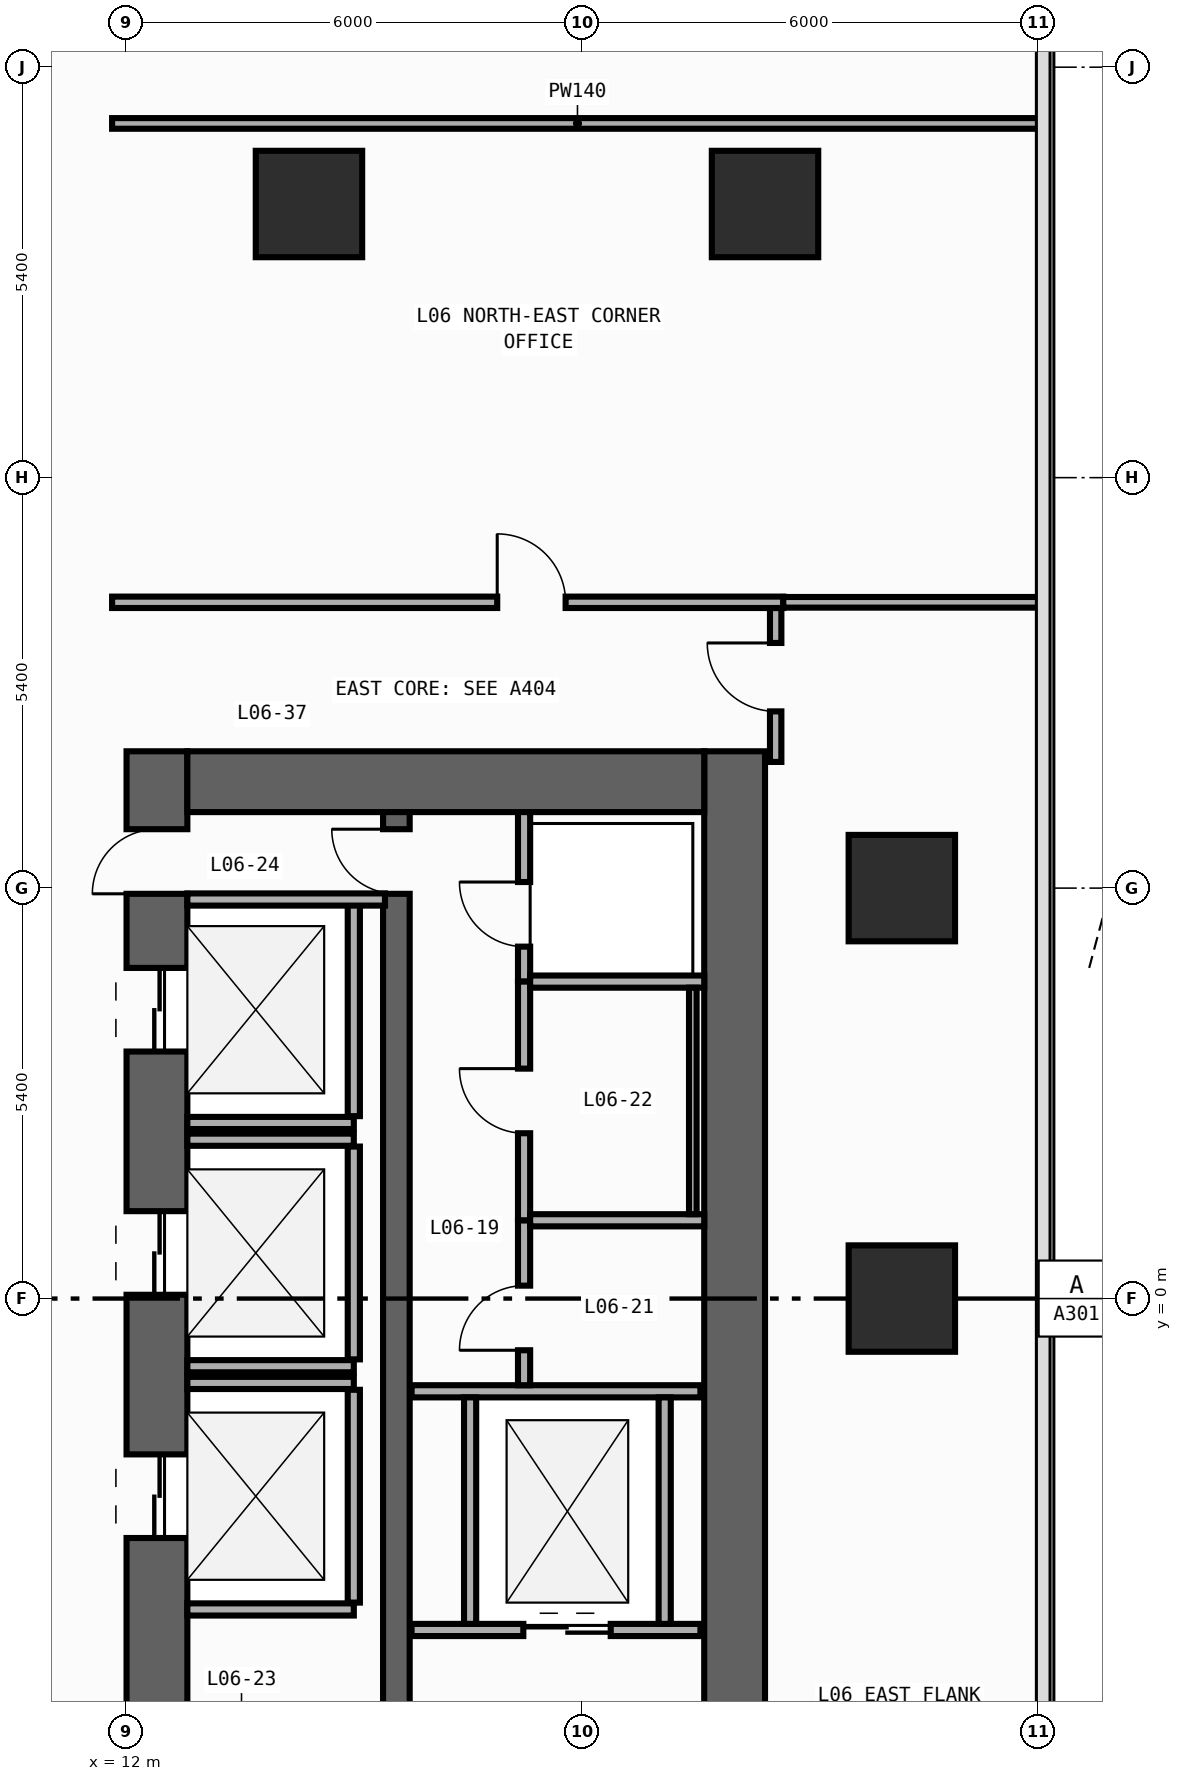
"""IFC4 building model, lengths in metres.
Left out: names, types, materials, properties, quantities, classifications, styles, units other than length and angle.
Written with IfcOpenShell. Run it as: python <this file> out.ifc"""

import sys

from ifc_helpers import new_model, si_unit, direction, frame, frame_2d, origin, origin_2d, place, context, subcontext, project, spatial, rectangle, extrude, element, fill, save


model = new_model("IFC4")
c1 = context("Model", 3, precision=1e-05, world=origin(), true_north=direction((0.0, 1.0)))
c2 = subcontext(c1, "Body", "Model", "MODEL_VIEW")
j1 = project(units=[si_unit("LENGTHUNIT", "METRE"), si_unit("PLANEANGLEUNIT", "RADIAN")], contexts=[c1])
p1 = place(None, origin())
s1 = spatial("IfcSite", under=j1, at=p1, CompositionType="ELEMENT")
p2 = place(p1, origin())
s2 = spatial("IfcBuilding", under=s1, at=p2, CompositionType="ELEMENT")
p3 = place(p2, frame((0.0, 0.0, 26.0)))
s3 = spatial("IfcBuildingStorey", under=s2, at=p3, CompositionType="ELEMENT", Elevation=26.0)
p4 = place(p3, frame((12.4, -19.8, 0.0), z_axis=(0.0, 0.0, 1.0), x_axis=(0.0, 1.0, 0.0)))
e1 = element("IfcWall", 1, at=p4, inside=s3, PredefinedType="SHEAR", context=c2, shape_type="SweptSolid", body=[
    extrude(rectangle(XDim=27.0, YDim=0.8, at=frame_2d((13.5, 0.0))), origin(), (0.0, 0.0, 1.0), 3.94),
])
p5 = place(p4, frame((23.05, 0.0, 0.0)))
e2 = element("IfcOpeningElement", 2, at=p5, cuts=e1, PredefinedType="OPENING", context=c2, shape_type="SweptSolid", body=[
    extrude(rectangle(XDim=1.1, YDim=2.2, at=frame_2d((0.55, 1.1))), frame((0.0, 0.41, 0.0), z_axis=(0.0, -1.0, 0.0), x_axis=(1.0, 0.0, 0.0)), (0.0, 0.0, 1.0), 0.82),
])
p6 = place(p4, frame((19.85, 0.0, 0.0)))
e3 = element("IfcOpeningElement", 3, at=p6, cuts=e1, PredefinedType="OPENING", context=c2, shape_type="SweptSolid", body=[
    extrude(rectangle(XDim=1.1, YDim=2.2, at=frame_2d((0.55, 1.1))), frame((0.0, 0.41, 0.0), z_axis=(0.0, -1.0, 0.0), x_axis=(1.0, 0.0, 0.0)), (0.0, 0.0, 1.0), 0.82),
])
p7 = place(p4, frame((16.65, 0.0, 0.0)))
e4 = element("IfcOpeningElement", 4, at=p7, cuts=e1, PredefinedType="OPENING", context=c2, shape_type="SweptSolid", body=[
    extrude(rectangle(XDim=1.1, YDim=2.2, at=frame_2d((0.55, 1.1))), frame((0.0, 0.41, 0.0), z_axis=(0.0, -1.0, 0.0), x_axis=(1.0, 0.0, 0.0)), (0.0, 0.0, 1.0), 0.82),
])
p8 = place(p4, frame((6.275, 0.0, 0.0)))
e5 = element("IfcOpeningElement", 5, at=p8, cuts=e1, PredefinedType="OPENING", context=c2, shape_type="SweptSolid", body=[
    extrude(rectangle(XDim=0.85, YDim=2.1, at=frame_2d((0.425, 1.05))), frame((0.0, 0.41, 0.0), z_axis=(0.0, -1.0, 0.0), x_axis=(1.0, 0.0, 0.0)), (0.0, 0.0, 1.0), 0.82),
])
p9 = place(p4, frame((8.575, 0.0, 0.0)))
e6 = element("IfcOpeningElement", 6, at=p9, cuts=e1, PredefinedType="OPENING", context=c2, shape_type="SweptSolid", body=[
    extrude(rectangle(XDim=0.85, YDim=2.1, at=frame_2d((0.425, 1.05))), frame((0.0, 0.41, 0.0), z_axis=(0.0, -1.0, 0.0), x_axis=(1.0, 0.0, 0.0)), (0.0, 0.0, 1.0), 0.82),
])
p10 = place(p4, frame((10.675, 0.0, 0.0)))
e7 = element("IfcOpeningElement", 7, at=p10, cuts=e1, PredefinedType="OPENING", context=c2, shape_type="SweptSolid", body=[
    extrude(rectangle(XDim=0.85, YDim=2.1, at=frame_2d((0.425, 1.05))), frame((0.0, 0.41, 0.0), z_axis=(0.0, -1.0, 0.0), x_axis=(1.0, 0.0, 0.0)), (0.0, 0.0, 1.0), 0.82),
])
p11 = place(p4, frame((12.725, 0.0, 0.0)))
e8 = element("IfcOpeningElement", 8, at=p11, cuts=e1, PredefinedType="OPENING", context=c2, shape_type="SweptSolid", body=[
    extrude(rectangle(XDim=1.15, YDim=2.2, at=frame_2d((0.575, 1.1))), frame((0.0, 0.41, 0.0), z_axis=(0.0, -1.0, 0.0), x_axis=(1.0, 0.0, 0.0)), (0.0, 0.0, 1.0), 0.82),
])
p12 = place(p4, frame((25.125, 0.0, 0.0)))
e9 = element("IfcOpeningElement", 9, at=p12, cuts=e1, PredefinedType="OPENING", context=c2, shape_type="SweptSolid", body=[
    extrude(rectangle(XDim=0.85, YDim=2.1, at=frame_2d((0.425, 1.05))), frame((0.0, 0.41, 0.0), z_axis=(0.0, -1.0, 0.0), x_axis=(1.0, 0.0, 0.0)), (0.0, 0.0, 1.0), 0.82),
])
p13 = place(p3, frame((20.0, -19.8, 0.0), z_axis=(0.0, 0.0, 1.0), x_axis=(0.0, 1.0, 0.0)))
e10 = element("IfcWall", 10, at=p13, inside=s3, PredefinedType="SHEAR", context=c2, shape_type="SweptSolid", body=[
    extrude(rectangle(XDim=27.0, YDim=0.8, at=frame_2d((13.5, 0.0))), origin(), (0.0, 0.0, 1.0), 3.94),
])
p14 = place(p3, frame((12.8, 6.8, 0.0), z_axis=(0.0, 0.0, 1.0), x_axis=(1.0, 0.0, 0.0)))
e11 = element("IfcWall", 11, at=p14, inside=s3, PredefinedType="SHEAR", context=c2, shape_type="SweptSolid", body=[
    extrude(rectangle(XDim=6.8, YDim=0.8, at=frame_2d((3.4, 0.0))), origin(), (0.0, 0.0, 1.0), 3.94),
])
p15 = place(p3, frame((15.55, -19.0, 0.0), z_axis=(0.0, 0.0, 1.0), x_axis=(0.0, 1.0, 0.0)))
e12 = element("IfcWall", 12, at=p15, inside=s3, PredefinedType="SHEAR", context=c2, shape_type="SweptSolid", body=[
    extrude(rectangle(XDim=25.4, YDim=0.35, at=frame_2d((12.7, 0.0))), origin(), (0.0, 0.0, 1.0), 3.94),
])
p16 = place(p15, frame((11.925, 0.0, 0.0)))
e13 = element("IfcOpeningElement", 13, at=p16, cuts=e12, PredefinedType="OPENING", context=c2, shape_type="SweptSolid", body=[
    extrude(rectangle(XDim=1.15, YDim=2.2, at=frame_2d((0.575, 1.1))), frame((0.0, 0.185, 0.0), z_axis=(0.0, -1.0, 0.0), x_axis=(1.0, 0.0, 0.0)), (0.0, 0.0, 1.0), 0.37),
])
p17 = place(p15, frame((24.325, 0.0, 0.0)))
e14 = element("IfcOpeningElement", 14, at=p17, cuts=e12, PredefinedType="OPENING", context=c2, shape_type="SweptSolid", body=[
    extrude(rectangle(XDim=0.85, YDim=2.1, at=frame_2d((0.425, 1.05))), frame((0.0, 0.185, 0.0), z_axis=(0.0, -1.0, 0.0), x_axis=(1.0, 0.0, 0.0)), (0.0, 0.0, 1.0), 0.37),
])
for number, where, z_axis, x_axis in (
    (15, (20.4, 14.4, 0.0), (0.0, 0.0, 1.0), (1.0, 0.0, 0.0)),
    (16, (14.4, 14.4, 0.0), (0.0, 0.0, 1.0), (1.0, 0.0, 0.0)),
    (17, (22.2, 0.0, 0.0), (0.0, 0.0, 1.0), (1.0, 0.0, 0.0)),
    (18, (22.2, 5.4, 0.0), (0.0, 0.0, 1.0), (1.0, 0.0, 0.0)),
):
    element("IfcColumn", number, at=place(p3, frame(where, z_axis=z_axis, x_axis=x_axis)), inside=s3, PredefinedType="COLUMN", context=c2, shape_type="SweptSolid", body=[
        extrude(rectangle(XDim=1.4, YDim=1.4, at=origin_2d()), origin(), (0.0, 0.0, 1.0), 4.2),
    ])
p18 = place(p3, frame((12.8, 2.31, 0.0), z_axis=(0.0, 0.0, 1.0), x_axis=(1.0, 0.0, 0.0)))
e19 = element("IfcWall", 19, at=p18, inside=s3, PredefinedType="STANDARD", context=c2, shape_type="SweptSolid", body=[
    extrude(rectangle(XDim=2.19, YDim=0.16, at=frame_2d((1.095, 0.0))), origin(), (0.0, 0.0, 1.0), 3.94),
])
p19 = place(p3, frame((14.99, 2.4, 0.0), z_axis=(0.0, 0.0, 1.0), x_axis=(0.0, 1.0, 0.0)))
e20 = element("IfcWall", 20, at=p19, inside=s3, PredefinedType="STANDARD", context=c2, shape_type="SweptSolid", body=[
    extrude(rectangle(XDim=2.8, YDim=0.16, at=frame_2d((1.4, 0.0))), origin(), (0.0, 0.0, 1.0), 3.94),
])
for number, where, z_axis, x_axis in (
    (21, (12.8, -0.89, 0.0), (0.0, 0.0, 1.0), (1.0, 0.0, 0.0)),
    (22, (12.8, 2.09, 0.0), (0.0, 0.0, 1.0), (1.0, 0.0, 0.0)),
):
    element("IfcWall", number, at=place(p3, frame(where, z_axis=z_axis, x_axis=x_axis)), inside=s3, PredefinedType="STANDARD", context=c2, shape_type="SweptSolid", body=[
        extrude(rectangle(XDim=2.19, YDim=0.16, at=frame_2d((1.095, 0.0))), origin(), (0.0, 0.0, 1.0), 3.94),
    ])
p20 = place(p3, frame((14.99, -0.8, 0.0), z_axis=(0.0, 0.0, 1.0), x_axis=(0.0, 1.0, 0.0)))
e23 = element("IfcWall", 23, at=p20, inside=s3, PredefinedType="STANDARD", context=c2, shape_type="SweptSolid", body=[
    extrude(rectangle(XDim=2.8, YDim=0.16, at=frame_2d((1.4, 0.0))), origin(), (0.0, 0.0, 1.0), 3.94),
])
for number, where, z_axis, x_axis in (
    (24, (12.8, -4.09, 0.0), (0.0, 0.0, 1.0), (1.0, 0.0, 0.0)),
    (25, (12.8, -1.11, 0.0), (0.0, 0.0, 1.0), (1.0, 0.0, 0.0)),
):
    element("IfcWall", number, at=place(p3, frame(where, z_axis=z_axis, x_axis=x_axis)), inside=s3, PredefinedType="STANDARD", context=c2, shape_type="SweptSolid", body=[
        extrude(rectangle(XDim=2.19, YDim=0.16, at=frame_2d((1.095, 0.0))), origin(), (0.0, 0.0, 1.0), 3.94),
    ])
p21 = place(p3, frame((14.99, -4.0, 0.0), z_axis=(0.0, 0.0, 1.0), x_axis=(0.0, 1.0, 0.0)))
e26 = element("IfcWall", 26, at=p21, inside=s3, PredefinedType="STANDARD", context=c2, shape_type="SweptSolid", body=[
    extrude(rectangle(XDim=2.8, YDim=0.16, at=frame_2d((1.4, 0.0))), origin(), (0.0, 0.0, 1.0), 3.94),
])
p22 = place(p3, frame((15.75, -4.36, 0.0), z_axis=(0.0, 0.0, 1.0), x_axis=(1.0, 0.0, 0.0)))
e27 = element("IfcWall", 27, at=p22, inside=s3, PredefinedType="STANDARD", context=c2, shape_type="SweptSolid", body=[
    extrude(rectangle(XDim=3.8, YDim=0.16, at=frame_2d((1.9, 0.0))), origin(), (0.0, 0.0, 1.0), 3.94),
])
p23 = place(p22, frame((1.47, 0.0, 0.0)))
e28 = element("IfcOpeningElement", 28, at=p23, cuts=e27, PredefinedType="OPENING", context=c2, shape_type="SweptSolid", body=[
    extrude(rectangle(XDim=1.15, YDim=2.2, at=frame_2d((0.575, 1.1))), frame((0.0, 0.09, 0.0), z_axis=(0.0, -1.0, 0.0), x_axis=(1.0, 0.0, 0.0)), (0.0, 0.0, 1.0), 0.18),
])
p24 = place(p3, frame((15.75, -1.22, 0.0), z_axis=(0.0, 0.0, 1.0), x_axis=(1.0, 0.0, 0.0)))
e29 = element("IfcWall", 29, at=p24, inside=s3, PredefinedType="STANDARD", context=c2, shape_type="SweptSolid", body=[
    extrude(rectangle(XDim=3.8, YDim=0.16, at=frame_2d((1.9, 0.0))), origin(), (0.0, 0.0, 1.0), 3.94),
])
for number, where, z_axis, x_axis in (
    (30, (16.52, -4.28, 0.0), (0.0, 0.0, 1.0), (0.0, 1.0, 0.0)),
    (31, (19.08, -4.28, 0.0), (0.0, 0.0, 1.0), (0.0, 1.0, 0.0)),
):
    element("IfcWall", number, at=place(p3, frame(where, z_axis=z_axis, x_axis=x_axis)), inside=s3, PredefinedType="STANDARD", context=c2, shape_type="SweptSolid", body=[
        extrude(rectangle(XDim=2.98, YDim=0.16, at=frame_2d((1.49, 0.0))), origin(), (0.0, 0.0, 1.0), 3.94),
    ])
p25 = place(p3, frame((12.8, 5.25, 0.0), z_axis=(0.0, 0.0, 1.0), x_axis=(1.0, 0.0, 0.0)))
e32 = element("IfcWall", 32, at=p25, inside=s3, PredefinedType="STANDARD", context=c2, shape_type="SweptSolid", body=[
    extrude(rectangle(XDim=2.6, YDim=0.16, at=frame_2d((1.3, 0.0))), origin(), (0.0, 0.0, 1.0), 3.94),
])
p26 = place(p3, frame((17.23, 4.17, 0.0), z_axis=(0.0, 0.0, 1.0), x_axis=(0.0, 1.0, 0.0)))
e33 = element("IfcWall", 33, at=p26, inside=s3, PredefinedType="PARTITIONING", context=c2, shape_type="SweptSolid", body=[
    extrude(rectangle(XDim=2.23, YDim=0.16, at=frame_2d((1.115, 0.0))), origin(), (0.0, 0.0, 1.0), 3.94),
])
p27 = place(p26, frame((0.46, 0.0, 0.0)))
e34 = element("IfcOpeningElement", 34, at=p27, cuts=e33, PredefinedType="OPENING", context=c2, shape_type="SweptSolid", body=[
    extrude(rectangle(XDim=0.85, YDim=2.1, at=frame_2d((0.425, 1.05))), frame((0.0, 0.09, 0.0), z_axis=(0.0, -1.0, 0.0), x_axis=(1.0, 0.0, 0.0)), (0.0, 0.0, 1.0), 0.18),
])
p28 = place(p3, frame((17.23, -1.14, 0.0), z_axis=(0.0, 0.0, 1.0), x_axis=(0.0, 1.0, 0.0)))
e35 = element("IfcWall", 35, at=p28, inside=s3, PredefinedType="PARTITIONING", context=c2, shape_type="SweptSolid", body=[
    extrude(rectangle(XDim=2.17, YDim=0.16, at=frame_2d((1.085, 0.0))), origin(), (0.0, 0.0, 1.0), 3.94),
])
p29 = place(p28, frame((0.46, 0.0, 0.0)))
e36 = element("IfcOpeningElement", 36, at=p29, cuts=e35, PredefinedType="OPENING", context=c2, shape_type="SweptSolid", body=[
    extrude(rectangle(XDim=0.85, YDim=2.1, at=frame_2d((0.425, 1.05))), frame((0.0, 0.09, 0.0), z_axis=(0.0, -1.0, 0.0), x_axis=(1.0, 0.0, 0.0)), (0.0, 0.0, 1.0), 0.18),
])
p30 = place(p3, frame((17.23, 1.03, 0.0), z_axis=(0.0, 0.0, 1.0), x_axis=(0.0, 1.0, 0.0)))
e37 = element("IfcWall", 37, at=p30, inside=s3, PredefinedType="PARTITIONING", context=c2, shape_type="SweptSolid", body=[
    extrude(rectangle(XDim=3.14, YDim=0.16, at=frame_2d((1.57, 0.0))), origin(), (0.0, 0.0, 1.0), 3.94),
])
p31 = place(p30, frame((1.145, 0.0, 0.0)))
e38 = element("IfcOpeningElement", 38, at=p31, cuts=e37, PredefinedType="OPENING", context=c2, shape_type="SweptSolid", body=[
    extrude(rectangle(XDim=0.85, YDim=2.1, at=frame_2d((0.425, 1.05))), frame((0.0, 0.09, 0.0), z_axis=(0.0, -1.0, 0.0), x_axis=(1.0, 0.0, 0.0)), (0.0, 0.0, 1.0), 0.18),
])
for number, where, z_axis, x_axis in (
    (39, (17.31, 4.17, 0.0), (0.0, 0.0, 1.0), (1.0, 0.0, 0.0)),
    (40, (17.31, 1.03, 0.0), (0.0, 0.0, 1.0), (1.0, 0.0, 0.0)),
):
    element("IfcWall", number, at=place(p3, frame(where, z_axis=z_axis, x_axis=x_axis)), inside=s3, PredefinedType="PARTITIONING", context=c2, shape_type="SweptSolid", body=[
        extrude(rectangle(XDim=2.29, YDim=0.16, at=frame_2d((1.145, 0.0))), origin(), (0.0, 0.0, 1.0), 3.94),
    ])
p32 = place(p3, frame((20.54, 7.06, 0.0), z_axis=(0.0, 0.0, 1.0), x_axis=(0.0, 1.0, 0.0)))
e41 = element("IfcWall", 41, at=p32, inside=s3, PredefinedType="PARTITIONING", context=c2, shape_type="SweptSolid", body=[
    extrude(rectangle(XDim=2.025, YDim=0.15, at=frame_2d((1.012, 0.0))), origin(), (0.0, 0.0, 1.0), 3.94),
])
p33 = place(p32, frame((0.665, 0.0, 0.0)))
e42 = element("IfcOpeningElement", 42, at=p33, cuts=e41, PredefinedType="OPENING", context=c2, shape_type="SweptSolid", body=[
    extrude(rectangle(XDim=0.9, YDim=2.15, at=frame_2d((0.45, 1.075))), frame((0.0, 0.085, 0.0), z_axis=(0.0, -1.0, 0.0), x_axis=(1.0, 0.0, 0.0)), (0.0, 0.0, 1.0), 0.17),
])
p34 = place(p3, frame((11.81, 9.16, 0.0), z_axis=(0.0, 0.0, 1.0), x_axis=(1.0, 0.0, 0.0)))
e43 = element("IfcWall", 43, at=p34, inside=s3, PredefinedType="PARTITIONING", context=c2, shape_type="SweptSolid", body=[
    extrude(rectangle(XDim=8.83, YDim=0.15, at=frame_2d((4.415, 0.0))), origin(), (0.0, 0.0, 1.0), 3.94),
])
p35 = place(p34, frame((5.067, 0.0, 0.0)))
e44 = element("IfcOpeningElement", 44, at=p35, cuts=e43, PredefinedType="OPENING", context=c2, shape_type="SweptSolid", body=[
    extrude(rectangle(XDim=0.9, YDim=2.15, at=frame_2d((0.45, 1.075))), frame((0.0, 0.085, 0.0), z_axis=(0.0, -1.0, 0.0), x_axis=(1.0, 0.0, 0.0)), (0.0, 0.0, 1.0), 0.17),
])
p36 = place(p3, frame((20.64, 9.16, 0.0), z_axis=(0.0, 0.0, 1.0), x_axis=(1.0, 0.0, 0.0)))
e45 = element("IfcWall", 45, at=p36, inside=s3, PredefinedType="PARTITIONING", context=c2, shape_type="SweptSolid", body=[
    extrude(rectangle(XDim=3.415, YDim=0.14, at=frame_2d((1.708, 0.0))), origin(), (0.0, 0.0, 1.0), 3.94),
])
p37 = place(p3, frame((11.81, 15.46, 0.0), z_axis=(0.0, 0.0, 1.0), x_axis=(1.0, 0.0, 0.0)))
e46 = element("IfcWall", 46, at=p37, inside=s3, PredefinedType="PARTITIONING", context=c2, shape_type="SweptSolid", body=[
    extrude(rectangle(XDim=12.245, YDim=0.14, at=frame_2d((6.123, 0.0))), origin(), (0.0, 0.0, 1.0), 3.94),
])
p38 = place(p3, frame((19.45, 4.09, 0.0), z_axis=(0.0, 0.0, 1.0), x_axis=(0.0, -1.0, 0.0)))
e47 = element("IfcWall", 47, at=p38, inside=s3, PredefinedType="PARTITIONING", context=c2, shape_type="SweptSolid", body=[
    extrude(rectangle(XDim=2.98, YDim=0.1, at=frame_2d((1.49, 0.0))), origin(), (0.0, 0.0, 1.0), 3.94),
])
p39 = place(p5, origin())
e48 = element("IfcDoor", 48, at=p39, inside=s3, OperationType="DOUBLE_DOOR_SLIDING", PredefinedType="DOOR", context=c2, shape_type="SweptSolid", body=[
    extrude(rectangle(XDim=1.1, YDim=2.2, at=frame_2d((0.55, 1.1))), frame((0.0, 0.025, 0.0), z_axis=(0.0, -1.0, 0.0), x_axis=(1.0, 0.0, 0.0)), (0.0, 0.0, 1.0), 0.05),
])
fill(e2, e48)
p40 = place(p6, origin())
e49 = element("IfcDoor", 49, at=p40, inside=s3, OperationType="DOUBLE_DOOR_SLIDING", PredefinedType="DOOR", context=c2, shape_type="SweptSolid", body=[
    extrude(rectangle(XDim=1.1, YDim=2.2, at=frame_2d((0.55, 1.1))), frame((0.0, 0.025, 0.0), z_axis=(0.0, -1.0, 0.0), x_axis=(1.0, 0.0, 0.0)), (0.0, 0.0, 1.0), 0.05),
])
fill(e3, e49)
p41 = place(p7, origin())
e50 = element("IfcDoor", 50, at=p41, inside=s3, OperationType="DOUBLE_DOOR_SLIDING", PredefinedType="DOOR", context=c2, shape_type="SweptSolid", body=[
    extrude(rectangle(XDim=1.1, YDim=2.2, at=frame_2d((0.55, 1.1))), frame((0.0, 0.025, 0.0), z_axis=(0.0, -1.0, 0.0), x_axis=(1.0, 0.0, 0.0)), (0.0, 0.0, 1.0), 0.05),
])
fill(e4, e50)
p42 = place(p12, origin())
e51 = element("IfcDoor", 51, at=p42, inside=s3, OperationType="SINGLE_SWING_LEFT", PredefinedType="DOOR", context=c2, shape_type="SweptSolid", body=[
    extrude(rectangle(XDim=0.85, YDim=2.1, at=frame_2d((0.425, 1.05))), frame((0.0, 0.025, 0.0), z_axis=(0.0, -1.0, 0.0), x_axis=(1.0, 0.0, 0.0)), (0.0, 0.0, 1.0), 0.05),
])
fill(e9, e51)
p43 = place(p17, origin())
e52 = element("IfcDoor", 52, at=p43, inside=s3, OperationType="SINGLE_SWING_RIGHT", PredefinedType="DOOR", context=c2, shape_type="SweptSolid", body=[
    extrude(rectangle(XDim=0.85, YDim=2.1, at=frame_2d((0.425, 1.05))), frame((0.0, 0.025, 0.0), z_axis=(0.0, -1.0, 0.0), x_axis=(1.0, 0.0, 0.0)), (0.0, 0.0, 1.0), 0.05),
])
fill(e14, e52)
p44 = place(p23, origin())
e53 = element("IfcDoor", 53, at=p44, inside=s3, OperationType="DOUBLE_DOOR_SLIDING", PredefinedType="DOOR", context=c2, shape_type="SweptSolid", body=[
    extrude(rectangle(XDim=1.15, YDim=2.2, at=frame_2d((0.575, 1.1))), frame((0.0, 0.025, 0.0), z_axis=(0.0, -1.0, 0.0), x_axis=(1.0, 0.0, 0.0)), (0.0, 0.0, 1.0), 0.05),
])
fill(e28, e53)
p45 = place(p27, origin())
e54 = element("IfcDoor", 54, at=p45, inside=s3, OperationType="SINGLE_SWING_RIGHT", PredefinedType="DOOR", context=c2, shape_type="SweptSolid", body=[
    extrude(rectangle(XDim=0.85, YDim=2.1, at=frame_2d((0.425, 1.05))), frame((0.0, 0.025, 0.0), z_axis=(0.0, -1.0, 0.0), x_axis=(1.0, 0.0, 0.0)), (0.0, 0.0, 1.0), 0.05),
])
fill(e34, e54)
p46 = place(p29, origin())
e55 = element("IfcDoor", 55, at=p46, inside=s3, OperationType="SINGLE_SWING_LEFT", PredefinedType="DOOR", context=c2, shape_type="SweptSolid", body=[
    extrude(rectangle(XDim=0.85, YDim=2.1, at=frame_2d((0.425, 1.05))), frame((0.0, 0.025, 0.0), z_axis=(0.0, -1.0, 0.0), x_axis=(1.0, 0.0, 0.0)), (0.0, 0.0, 1.0), 0.05),
])
fill(e36, e55)
p47 = place(p31, origin())
e56 = element("IfcDoor", 56, at=p47, inside=s3, OperationType="SINGLE_SWING_RIGHT", PredefinedType="DOOR", context=c2, shape_type="SweptSolid", body=[
    extrude(rectangle(XDim=0.85, YDim=2.1, at=frame_2d((0.425, 1.05))), frame((0.0, 0.025, 0.0), z_axis=(0.0, -1.0, 0.0), x_axis=(1.0, 0.0, 0.0)), (0.0, 0.0, 1.0), 0.05),
])
fill(e38, e56)
p48 = place(p33, origin())
e57 = element("IfcDoor", 57, at=p48, inside=s3, OperationType="SINGLE_SWING_RIGHT", PredefinedType="DOOR", context=c2, shape_type="SweptSolid", body=[
    extrude(rectangle(XDim=0.9, YDim=2.15, at=frame_2d((0.45, 1.075))), frame((0.0, 0.025, 0.0), z_axis=(0.0, -1.0, 0.0), x_axis=(1.0, 0.0, 0.0)), (0.0, 0.0, 1.0), 0.05),
])
fill(e42, e57)
p49 = place(p35, origin())
e58 = element("IfcDoor", 58, at=p49, inside=s3, OperationType="SINGLE_SWING_LEFT", PredefinedType="DOOR", context=c2, shape_type="SweptSolid", body=[
    extrude(rectangle(XDim=0.9, YDim=2.15, at=frame_2d((0.45, 1.075))), frame((0.0, 0.025, 0.0), z_axis=(0.0, -1.0, 0.0), x_axis=(1.0, 0.0, 0.0)), (0.0, 0.0, 1.0), 0.05),
])
fill(e44, e58)
save(model, sys.argv[1])
